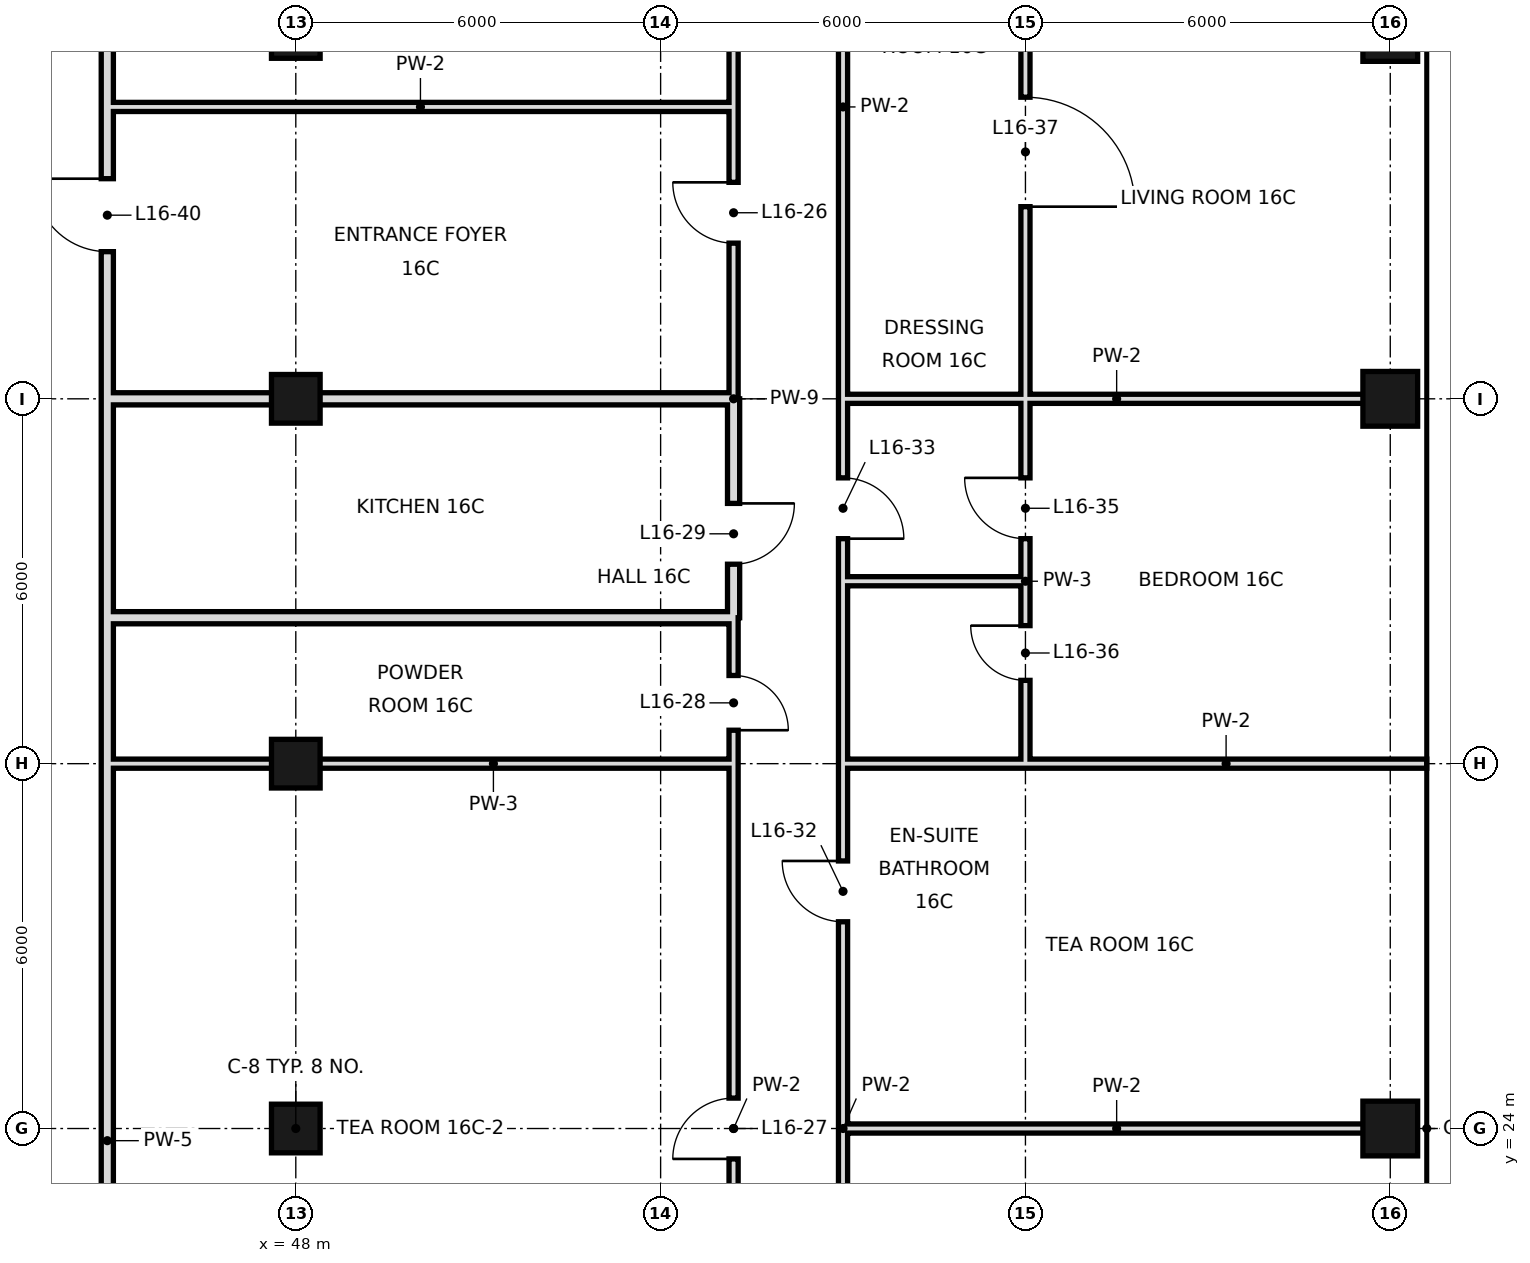
"""IFC4 building model, lengths in metres.
Left out: names, types, materials, properties, quantities, classifications, styles, units other than length and angle.
Written with IfcOpenShell. Run it as: python <this file> out.ifc"""

import sys

from ifc_helpers import new_model, si_unit, direction, frame, frame_2d, origin, origin_2d, place, context, subcontext, project, spatial, rectangle, hollow_rectangle, extrude, element, fill, save


model = new_model("IFC4")
c1 = context("Model", 3, precision=1e-05, world=origin(), true_north=direction((0.0, 1.0)))
c2 = subcontext(c1, "Body", "Model", "MODEL_VIEW")
j1 = project(units=[si_unit("LENGTHUNIT", "METRE"), si_unit("PLANEANGLEUNIT", "RADIAN")], contexts=[c1])
p1 = place(None, origin())
s1 = spatial("IfcSite", under=j1, at=p1, CompositionType="ELEMENT")
p2 = place(p1, origin())
s2 = spatial("IfcBuilding", under=s1, at=p2, CompositionType="ELEMENT")
p3 = place(p2, frame((0.0, 0.0, 78.6)))
s3 = spatial("IfcBuildingStorey", under=s2, at=p3, CompositionType="ELEMENT", Elevation=78.6)
for number, where, z_axis, x_axis in (
    (1, (48.0, 24.0, 0.0), (0.0, 0.0, 1.0), (1.0, 0.0, 0.0)),
    (2, (48.0, 30.0, 0.0), (0.0, 0.0, 1.0), (1.0, 0.0, 0.0)),
    (3, (48.0, 36.0, 0.0), (0.0, 0.0, 1.0), (1.0, 0.0, 0.0)),
    (4, (48.0, 42.0, 0.0), (0.0, 0.0, 1.0), (1.0, 0.0, 0.0)),
):
    element("IfcColumn", number, at=place(p3, frame(where, z_axis=z_axis, x_axis=x_axis)), inside=s3, PredefinedType="COLUMN", context=c2, shape_type="SweptSolid", body=[
        extrude(hollow_rectangle(XDim=0.8, YDim=0.8, WallThickness=0.04, at=origin_2d()), origin(), (0.0, 0.0, 1.0), 3.6),
    ])
for number, where, z_axis, x_axis in (
    (5, (66.0, 24.0, 0.0), (0.0, 0.0, 1.0), (1.0, 0.0, 0.0)),
    (6, (66.0, 36.0, 0.0), (0.0, 0.0, 1.0), (1.0, 0.0, 0.0)),
    (7, (66.0, 42.0, 0.0), (0.0, 0.0, 1.0), (1.0, 0.0, 0.0)),
):
    element("IfcColumn", number, at=place(p3, frame(where, z_axis=z_axis, x_axis=x_axis)), inside=s3, PredefinedType="COLUMN", context=c2, shape_type="SweptSolid", body=[
        extrude(hollow_rectangle(XDim=0.9, YDim=0.9, WallThickness=0.045, at=origin_2d()), origin(), (0.0, 0.0, 1.0), 3.6),
    ])
p4 = place(p3, frame((44.9, 18.7, 0.0), z_axis=(0.0, 0.0, 1.0), x_axis=(0.0, 1.0, 0.0)))
e8 = element("IfcWall", 8, at=p4, inside=s3, PredefinedType="SOLIDWALL", context=c2, shape_type="SweptSolid", body=[
    extrude(rectangle(XDim=13.7, YDim=0.2, at=frame_2d((6.85, 0.0))), origin(), (0.0, 0.0, 1.0), 2.97),
])
p5 = place(p3, frame((44.9, 36.0, 0.0), z_axis=(0.0, 0.0, 1.0), x_axis=(0.0, 1.0, 0.0)))
e9 = element("IfcWall", 9, at=p5, inside=s3, PredefinedType="SOLIDWALL", context=c2, shape_type="SweptSolid", body=[
    extrude(rectangle(XDim=12.6, YDim=0.2, at=frame_2d((6.3, 0.0))), origin(), (0.0, 0.0, 1.0), 2.72),
])
p6 = place(p5, frame((2.42, 0.0, 0.0)))
e10 = element("IfcOpeningElement", 10, at=p6, cuts=e9, PredefinedType="OPENING", context=c2, shape_type="SweptSolid", body=[
    extrude(rectangle(XDim=1.2, YDim=2.4, at=frame_2d((0.6, 1.2))), frame((0.0, 0.11, 0.0), z_axis=(0.0, -1.0, 0.0), x_axis=(1.0, 0.0, 0.0)), (0.0, 0.0, 1.0), 0.22),
])
p7 = place(p3, frame((44.9, 32.4, 0.0), z_axis=(0.0, 0.0, 1.0), x_axis=(0.0, 1.0, 0.0)))
e11 = element("IfcWall", 11, at=p7, inside=s3, PredefinedType="SOLIDWALL", context=c2, shape_type="SweptSolid", body=[
    extrude(rectangle(XDim=3.6, YDim=0.2, at=frame_2d((1.8, 0.0))), origin(), (0.0, 0.0, 1.0), 3.42),
])
p8 = place(p3, frame((55.2, 32.4, 0.0), z_axis=(0.0, 0.0, 1.0), x_axis=(0.0, 1.0, 0.0)))
e12 = element("IfcWall", 12, at=p8, inside=s3, PredefinedType="SOLIDWALL", context=c2, shape_type="SweptSolid", body=[
    extrude(rectangle(XDim=3.6, YDim=0.2, at=frame_2d((1.8, 0.0))), origin(), (0.0, 0.0, 1.0), 2.52),
])
p9 = place(p8, frame((0.88, 0.0, 0.0)))
e13 = element("IfcOpeningElement", 13, at=p9, cuts=e12, PredefinedType="OPENING", context=c2, shape_type="SweptSolid", body=[
    extrude(rectangle(XDim=1.0, YDim=2.4, at=frame_2d((0.5, 1.2))), frame((0.0, 0.11, 0.0), z_axis=(0.0, -1.0, 0.0), x_axis=(1.0, 0.0, 0.0)), (0.0, 0.0, 1.0), 0.22),
])
p10 = place(p3, frame((55.2, 18.0, 0.0), z_axis=(0.0, 0.0, 1.0), x_axis=(0.0, 1.0, 0.0)))
e14 = element("IfcWall", 14, at=p10, inside=s3, PredefinedType="PARTITIONING", context=c2, shape_type="SweptSolid", body=[
    extrude(rectangle(XDim=12.0, YDim=0.15, at=frame_2d((6.0, 0.0))), origin(), (0.0, 0.0, 1.0), 3.42),
])
p11 = place(p10, frame((5.5, 0.0, 0.0)))
e15 = element("IfcOpeningElement", 15, at=p11, cuts=e14, PredefinedType="OPENING", context=c2, shape_type="SweptSolid", body=[
    extrude(rectangle(XDim=1.0, YDim=2.4, at=frame_2d((0.5, 1.2))), frame((0.0, 0.085, 0.0), z_axis=(0.0, -1.0, 0.0), x_axis=(1.0, 0.0, 0.0)), (0.0, 0.0, 1.0), 0.17),
])
p12 = place(p3, frame((55.2, 36.0, 0.0), z_axis=(0.0, 0.0, 1.0), x_axis=(0.0, 1.0, 0.0)))
e16 = element("IfcWall", 16, at=p12, inside=s3, PredefinedType="PARTITIONING", context=c2, shape_type="SweptSolid", body=[
    extrude(rectangle(XDim=12.6, YDim=0.15, at=frame_2d((6.3, 0.0))), origin(), (0.0, 0.0, 1.0), 3.42),
])
p13 = place(p12, frame((2.56, 0.0, 0.0)))
e17 = element("IfcOpeningElement", 17, at=p13, cuts=e16, PredefinedType="OPENING", context=c2, shape_type="SweptSolid", body=[
    extrude(rectangle(XDim=1.0, YDim=2.4, at=frame_2d((0.5, 1.2))), frame((0.0, 0.085, 0.0), z_axis=(0.0, -1.0, 0.0), x_axis=(1.0, 0.0, 0.0)), (0.0, 0.0, 1.0), 0.17),
])
p14 = place(p12, frame((9.04, 0.0, 0.0)))
e18 = element("IfcOpeningElement", 18, at=p14, cuts=e16, PredefinedType="OPENING", context=c2, shape_type="SweptSolid", body=[
    extrude(rectangle(XDim=1.0, YDim=2.4, at=frame_2d((0.5, 1.2))), frame((0.0, 0.085, 0.0), z_axis=(0.0, -1.0, 0.0), x_axis=(1.0, 0.0, 0.0)), (0.0, 0.0, 1.0), 0.17),
])
p15 = place(p3, frame((55.2, 30.0, 0.0), z_axis=(0.0, 0.0, 1.0), x_axis=(0.0, 1.0, 0.0)))
e19 = element("IfcWall", 19, at=p15, inside=s3, PredefinedType="PARTITIONING", context=c2, shape_type="SweptSolid", body=[
    extrude(rectangle(XDim=2.4, YDim=0.15, at=frame_2d((1.2, 0.0))), origin(), (0.0, 0.0, 1.0), 3.42),
])
p16 = place(p15, frame((0.55, 0.0, 0.0)))
e20 = element("IfcOpeningElement", 20, at=p16, cuts=e19, PredefinedType="OPENING", context=c2, shape_type="SweptSolid", body=[
    extrude(rectangle(XDim=0.9, YDim=2.4, at=frame_2d((0.45, 1.2))), frame((0.0, 0.085, 0.0), z_axis=(0.0, -1.0, 0.0), x_axis=(1.0, 0.0, 0.0)), (0.0, 0.0, 1.0), 0.17),
])
p17 = place(p3, frame((57.0, 18.0, 0.0), z_axis=(0.0, 0.0, 1.0), x_axis=(0.0, 1.0, 0.0)))
e21 = element("IfcWall", 21, at=p17, inside=s3, PredefinedType="PARTITIONING", context=c2, shape_type="SweptSolid", body=[
    extrude(rectangle(XDim=12.0, YDim=0.15, at=frame_2d((6.0, 0.0))), origin(), (0.0, 0.0, 1.0), 3.42),
])
p18 = place(p17, frame((3.4, 0.0, 0.0)))
e22 = element("IfcOpeningElement", 22, at=p18, cuts=e21, PredefinedType="OPENING", context=c2, shape_type="SweptSolid", body=[
    extrude(rectangle(XDim=1.0, YDim=2.4, at=frame_2d((0.5, 1.2))), frame((0.0, 0.085, 0.0), z_axis=(0.0, -1.0, 0.0), x_axis=(1.0, 0.0, 0.0)), (0.0, 0.0, 1.0), 0.17),
])
p19 = place(p17, frame((9.4, 0.0, 0.0)))
e23 = element("IfcOpeningElement", 23, at=p19, cuts=e21, PredefinedType="OPENING", context=c2, shape_type="SweptSolid", body=[
    extrude(rectangle(XDim=1.0, YDim=2.4, at=frame_2d((0.5, 1.2))), frame((0.0, 0.085, 0.0), z_axis=(0.0, -1.0, 0.0), x_axis=(1.0, 0.0, 0.0)), (0.0, 0.0, 1.0), 0.17),
])
p20 = place(p3, frame((57.0, 33.0, 0.0), z_axis=(0.0, 0.0, 1.0), x_axis=(0.0, 1.0, 0.0)))
e24 = element("IfcWall", 24, at=p20, inside=s3, PredefinedType="PARTITIONING", context=c2, shape_type="SweptSolid", body=[
    extrude(rectangle(XDim=15.6, YDim=0.15, at=frame_2d((7.8, 0.0))), origin(), (0.0, 0.0, 1.0), 3.42),
])
p21 = place(p20, frame((0.7, 0.0, 0.0)))
e25 = element("IfcOpeningElement", 25, at=p21, cuts=e24, PredefinedType="OPENING", context=c2, shape_type="SweptSolid", body=[
    extrude(rectangle(XDim=1.0, YDim=2.4, at=frame_2d((0.5, 1.2))), frame((0.0, 0.085, 0.0), z_axis=(0.0, -1.0, 0.0), x_axis=(1.0, 0.0, 0.0)), (0.0, 0.0, 1.0), 0.17),
])
p22 = place(p20, frame((10.04, 0.0, 0.0)))
e26 = element("IfcOpeningElement", 26, at=p22, cuts=e24, PredefinedType="OPENING", context=c2, shape_type="SweptSolid", body=[
    extrude(rectangle(XDim=1.8, YDim=2.4, at=frame_2d((0.9, 1.2))), frame((0.0, 0.085, 0.0), z_axis=(0.0, -1.0, 0.0), x_axis=(1.0, 0.0, 0.0)), (0.0, 0.0, 1.0), 0.17),
])
p23 = place(p3, frame((57.0, 30.0, 0.0), z_axis=(0.0, 0.0, 1.0), x_axis=(0.0, 1.0, 0.0)))
e27 = element("IfcWall", 27, at=p23, inside=s3, PredefinedType="PARTITIONING", context=c2, shape_type="SweptSolid", body=[
    extrude(rectangle(XDim=3.0, YDim=0.15, at=frame_2d((1.5, 0.0))), origin(), (0.0, 0.0, 1.0), 3.42),
])
p24 = place(p3, frame((60.0, 33.0, 0.0), z_axis=(0.0, 0.0, 1.0), x_axis=(0.0, 1.0, 0.0)))
e28 = element("IfcWall", 28, at=p24, inside=s3, PredefinedType="PARTITIONING", context=c2, shape_type="SweptSolid", body=[
    extrude(rectangle(XDim=15.0, YDim=0.15, at=frame_2d((7.5, 0.0))), origin(), (0.0, 0.0, 1.0), 3.42),
])
p25 = place(p24, frame((0.7, 0.0, 0.0)))
e29 = element("IfcOpeningElement", 29, at=p25, cuts=e28, PredefinedType="OPENING", context=c2, shape_type="SweptSolid", body=[
    extrude(rectangle(XDim=1.0, YDim=2.4, at=frame_2d((0.5, 1.2))), frame((0.0, 0.085, 0.0), z_axis=(0.0, -1.0, 0.0), x_axis=(1.0, 0.0, 0.0)), (0.0, 0.0, 1.0), 0.17),
])
p26 = place(p24, frame((6.16, 0.0, 0.0)))
e30 = element("IfcOpeningElement", 30, at=p26, cuts=e28, PredefinedType="OPENING", context=c2, shape_type="SweptSolid", body=[
    extrude(rectangle(XDim=1.8, YDim=2.4, at=frame_2d((0.9, 1.2))), frame((0.0, 0.085, 0.0), z_axis=(0.0, -1.0, 0.0), x_axis=(1.0, 0.0, 0.0)), (0.0, 0.0, 1.0), 0.17),
])
p27 = place(p3, frame((60.0, 30.0, 0.0), z_axis=(0.0, 0.0, 1.0), x_axis=(0.0, 1.0, 0.0)))
e31 = element("IfcWall", 31, at=p27, inside=s3, PredefinedType="PARTITIONING", context=c2, shape_type="SweptSolid", body=[
    extrude(rectangle(XDim=3.0, YDim=0.15, at=frame_2d((1.5, 0.0))), origin(), (0.0, 0.0, 1.0), 3.42),
])
p28 = place(p27, frame((1.37, 0.0, 0.0)))
e32 = element("IfcOpeningElement", 32, at=p28, cuts=e31, PredefinedType="OPENING", context=c2, shape_type="SweptSolid", body=[
    extrude(rectangle(XDim=0.9, YDim=2.4, at=frame_2d((0.45, 1.2))), frame((0.0, 0.085, 0.0), z_axis=(0.0, -1.0, 0.0), x_axis=(1.0, 0.0, 0.0)), (0.0, 0.0, 1.0), 0.17),
])
p29 = place(p3, frame((57.0, 24.0, 0.0), z_axis=(0.0, 0.0, 1.0), x_axis=(1.0, 0.0, 0.0)))
e33 = element("IfcWall", 33, at=p29, inside=s3, PredefinedType="PARTITIONING", context=c2, shape_type="SweptSolid", body=[
    extrude(rectangle(XDim=9.0, YDim=0.15, at=frame_2d((4.5, 0.0))), origin(), (0.0, 0.0, 1.0), 2.52),
])
p30 = place(p3, frame((60.0, 30.0, 0.0), z_axis=(0.0, 0.0, 1.0), x_axis=(1.0, 0.0, 0.0)))
e34 = element("IfcWall", 34, at=p30, inside=s3, PredefinedType="PARTITIONING", context=c2, shape_type="SweptSolid", body=[
    extrude(rectangle(XDim=6.6, YDim=0.15, at=frame_2d((3.3, 0.0))), origin(), (0.0, 0.0, 1.0), 2.52),
])
p31 = place(p3, frame((44.9, 30.0, 0.0), z_axis=(0.0, 0.0, 1.0), x_axis=(1.0, 0.0, 0.0)))
e35 = element("IfcWall", 35, at=p31, inside=s3, PredefinedType="PARTITIONING", context=c2, shape_type="SweptSolid", body=[
    extrude(rectangle(XDim=10.3, YDim=0.15, at=frame_2d((5.15, 0.0))), origin(), (0.0, 0.0, 1.0), 2.52),
])
p32 = place(p3, frame((57.0, 30.0, 0.0), z_axis=(0.0, 0.0, 1.0), x_axis=(1.0, 0.0, 0.0)))
e36 = element("IfcWall", 36, at=p32, inside=s3, PredefinedType="PARTITIONING", context=c2, shape_type="SweptSolid", body=[
    extrude(rectangle(XDim=3.0, YDim=0.15, at=frame_2d((1.5, 0.0))), origin(), (0.0, 0.0, 1.0), 2.52),
])
p33 = place(p3, frame((44.9, 32.4, 0.0), z_axis=(0.0, 0.0, 1.0), x_axis=(1.0, 0.0, 0.0)))
e37 = element("IfcWall", 37, at=p33, inside=s3, PredefinedType="SOLIDWALL", context=c2, shape_type="SweptSolid", body=[
    extrude(rectangle(XDim=10.3, YDim=0.2, at=frame_2d((5.15, 0.0))), origin(), (0.0, 0.0, 1.0), 2.97),
])
p34 = place(p3, frame((57.0, 33.0, 0.0), z_axis=(0.0, 0.0, 1.0), x_axis=(1.0, 0.0, 0.0)))
e38 = element("IfcWall", 38, at=p34, inside=s3, PredefinedType="PARTITIONING", context=c2, shape_type="SweptSolid", body=[
    extrude(rectangle(XDim=3.0, YDim=0.15, at=frame_2d((1.5, 0.0))), origin(), (0.0, 0.0, 1.0), 3.42),
])
p35 = place(p3, frame((44.9, 36.0, 0.0), z_axis=(0.0, 0.0, 1.0), x_axis=(1.0, 0.0, 0.0)))
e39 = element("IfcWall", 39, at=p35, inside=s3, PredefinedType="SOLIDWALL", context=c2, shape_type="SweptSolid", body=[
    extrude(rectangle(XDim=10.3, YDim=0.2, at=frame_2d((5.15, 0.0))), origin(), (0.0, 0.0, 1.0), 2.52),
])
p36 = place(p3, frame((57.0, 36.0, 0.0), z_axis=(0.0, 0.0, 1.0), x_axis=(1.0, 0.0, 0.0)))
e40 = element("IfcWall", 40, at=p36, inside=s3, PredefinedType="PARTITIONING", context=c2, shape_type="SweptSolid", body=[
    extrude(rectangle(XDim=9.0, YDim=0.15, at=frame_2d((4.5, 0.0))), origin(), (0.0, 0.0, 1.0), 2.52),
])
p37 = place(p3, frame((44.9, 40.8, 0.0), z_axis=(0.0, 0.0, 1.0), x_axis=(1.0, 0.0, 0.0)))
e41 = element("IfcWall", 41, at=p37, inside=s3, PredefinedType="PARTITIONING", context=c2, shape_type="SweptSolid", body=[
    extrude(rectangle(XDim=10.3, YDim=0.15, at=frame_2d((5.15, 0.0))), origin(), (0.0, 0.0, 1.0), 3.42),
])
p38 = place(p13, frame((1.0, 0.0, 0.0), z_axis=(0.0, 0.0, 1.0), x_axis=(-1.0, 0.0, 0.0)))
e42 = element("IfcDoor", 42, at=p38, inside=s3, OperationType="SINGLE_SWING_LEFT", PredefinedType="DOOR", context=c2, shape_type="SweptSolid", body=[
    extrude(rectangle(XDim=1.0, YDim=2.4, at=frame_2d((0.5, 1.2))), frame((0.0, 0.025, 0.0), z_axis=(0.0, -1.0, 0.0), x_axis=(1.0, 0.0, 0.0)), (0.0, 0.0, 1.0), 0.05),
])
fill(e17, e42)
p39 = place(p11, origin())
e43 = element("IfcDoor", 43, at=p39, inside=s3, OperationType="SINGLE_SWING_LEFT", PredefinedType="DOOR", context=c2, shape_type="SweptSolid", body=[
    extrude(rectangle(XDim=1.0, YDim=2.4, at=frame_2d((0.5, 1.2))), frame((0.0, 0.025, 0.0), z_axis=(0.0, -1.0, 0.0), x_axis=(1.0, 0.0, 0.0)), (0.0, 0.0, 1.0), 0.05),
])
fill(e15, e43)
p40 = place(p16, frame((0.9, 0.0, 0.0), z_axis=(0.0, 0.0, 1.0), x_axis=(-1.0, 0.0, 0.0)))
e44 = element("IfcDoor", 44, at=p40, inside=s3, OperationType="SINGLE_SWING_RIGHT", PredefinedType="DOOR", context=c2, shape_type="SweptSolid", body=[
    extrude(rectangle(XDim=0.9, YDim=2.4, at=frame_2d((0.45, 1.2))), frame((0.0, 0.025, 0.0), z_axis=(0.0, -1.0, 0.0), x_axis=(1.0, 0.0, 0.0)), (0.0, 0.0, 1.0), 0.05),
])
fill(e20, e44)
p41 = place(p9, origin())
e45 = element("IfcDoor", 45, at=p41, inside=s3, OperationType="SINGLE_SWING_RIGHT", PredefinedType="DOOR", context=c2, shape_type="SweptSolid", body=[
    extrude(rectangle(XDim=1.0, YDim=2.4, at=frame_2d((0.5, 1.2))), frame((0.0, 0.025, 0.0), z_axis=(0.0, -1.0, 0.0), x_axis=(1.0, 0.0, 0.0)), (0.0, 0.0, 1.0), 0.05),
])
fill(e13, e45)
p42 = place(p19, frame((1.0, 0.0, 0.0), z_axis=(0.0, 0.0, 1.0), x_axis=(-1.0, 0.0, 0.0)))
e46 = element("IfcDoor", 46, at=p42, inside=s3, OperationType="SINGLE_SWING_LEFT", PredefinedType="DOOR", context=c2, shape_type="SweptSolid", body=[
    extrude(rectangle(XDim=1.0, YDim=2.4, at=frame_2d((0.5, 1.2))), frame((0.0, 0.025, 0.0), z_axis=(0.0, -1.0, 0.0), x_axis=(1.0, 0.0, 0.0)), (0.0, 0.0, 1.0), 0.05),
])
fill(e23, e46)
p43 = place(p21, frame((1.0, 0.0, 0.0), z_axis=(0.0, 0.0, 1.0), x_axis=(-1.0, 0.0, 0.0)))
e47 = element("IfcDoor", 47, at=p43, inside=s3, OperationType="SINGLE_SWING_RIGHT", PredefinedType="DOOR", context=c2, shape_type="SweptSolid", body=[
    extrude(rectangle(XDim=1.0, YDim=2.4, at=frame_2d((0.5, 1.2))), frame((0.0, 0.025, 0.0), z_axis=(0.0, -1.0, 0.0), x_axis=(1.0, 0.0, 0.0)), (0.0, 0.0, 1.0), 0.05),
])
fill(e25, e47)
p44 = place(p25, frame((1.0, 0.0, 0.0), z_axis=(0.0, 0.0, 1.0), x_axis=(-1.0, 0.0, 0.0)))
e48 = element("IfcDoor", 48, at=p44, inside=s3, OperationType="SINGLE_SWING_LEFT", PredefinedType="DOOR", context=c2, shape_type="SweptSolid", body=[
    extrude(rectangle(XDim=1.0, YDim=2.4, at=frame_2d((0.5, 1.2))), frame((0.0, 0.025, 0.0), z_axis=(0.0, -1.0, 0.0), x_axis=(1.0, 0.0, 0.0)), (0.0, 0.0, 1.0), 0.05),
])
fill(e29, e48)
p45 = place(p28, frame((0.9, 0.0, 0.0), z_axis=(0.0, 0.0, 1.0), x_axis=(-1.0, 0.0, 0.0)))
e49 = element("IfcDoor", 49, at=p45, inside=s3, OperationType="SINGLE_SWING_LEFT", PredefinedType="DOOR", context=c2, shape_type="SweptSolid", body=[
    extrude(rectangle(XDim=0.9, YDim=2.4, at=frame_2d((0.45, 1.2))), frame((0.0, 0.025, 0.0), z_axis=(0.0, -1.0, 0.0), x_axis=(1.0, 0.0, 0.0)), (0.0, 0.0, 1.0), 0.05),
])
fill(e32, e49)
p46 = place(p26, frame((1.8, 0.0, 0.0), z_axis=(0.0, 0.0, 1.0), x_axis=(-1.0, 0.0, 0.0)))
e50 = element("IfcDoor", 50, at=p46, inside=s3, OperationType="SINGLE_SWING_RIGHT", PredefinedType="DOOR", context=c2, shape_type="SweptSolid", body=[
    extrude(rectangle(XDim=1.8, YDim=2.4, at=frame_2d((0.9, 1.2))), frame((0.0, 0.025, 0.0), z_axis=(0.0, -1.0, 0.0), x_axis=(1.0, 0.0, 0.0)), (0.0, 0.0, 1.0), 0.05),
])
fill(e30, e50)
p47 = place(p6, frame((1.2, 0.0, 0.0), z_axis=(0.0, 0.0, 1.0), x_axis=(-1.0, 0.0, 0.0)))
e51 = element("IfcDoor", 51, at=p47, inside=s3, OperationType="SINGLE_SWING_LEFT", PredefinedType="DOOR", context=c2, shape_type="SweptSolid", body=[
    extrude(rectangle(XDim=1.2, YDim=2.4, at=frame_2d((0.6, 1.2))), frame((0.0, 0.025, 0.0), z_axis=(0.0, -1.0, 0.0), x_axis=(1.0, 0.0, 0.0)), (0.0, 0.0, 1.0), 0.05),
])
fill(e10, e51)
save(model, sys.argv[1])
